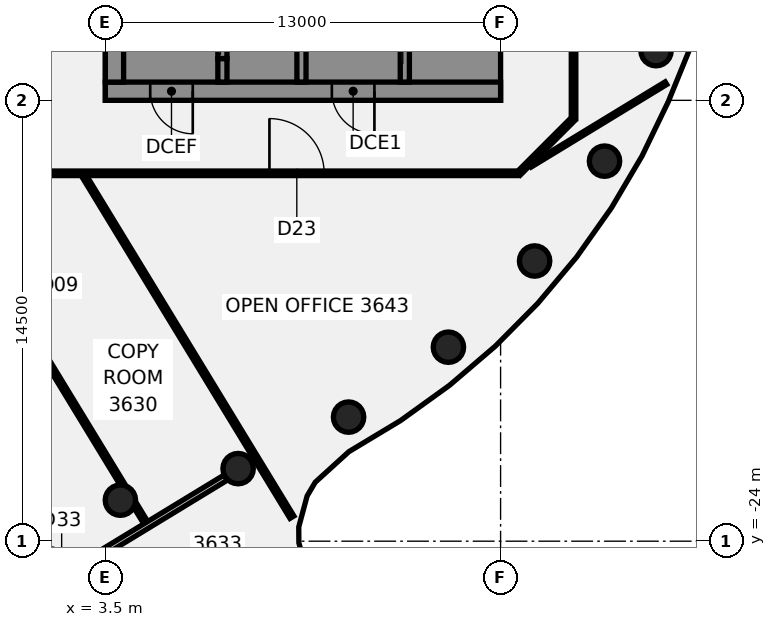
"""IFC4 building model, lengths in metres.
Left out: names, types, materials, properties, quantities, classifications, styles, units other than length and angle.
Written with IfcOpenShell. Run it as: python <this file> out.ifc"""

import sys

from ifc_helpers import new_model, si_unit, direction, frame, frame_2d, origin, origin_2d, place, context, subcontext, project, spatial, polyline, rectangle, circle, outline, extrude, element, fill, save


model = new_model("IFC4")
c1 = context("Model", 3, precision=1e-05, world=origin(), true_north=direction((0.0, 1.0)))
c2 = subcontext(c1, "Body", "Model", "MODEL_VIEW")
j1 = project(units=[si_unit("LENGTHUNIT", "METRE"), si_unit("PLANEANGLEUNIT", "RADIAN")], contexts=[c1])
p1 = place(None, origin())
s1 = spatial("IfcSite", under=j1, at=p1, CompositionType="ELEMENT")
p2 = place(p1, origin())
s2 = spatial("IfcBuilding", under=s1, at=p2, CompositionType="ELEMENT")
p3 = place(p2, frame((0.0, 0.0, 148.0)))
s3 = spatial("IfcBuildingStorey", under=s2, at=p3, CompositionType="ELEMENT", Elevation=148.0)
for number, where, z_axis, x_axis in (
    (1, (3.994, -22.651, -0.14), (0.0, 0.0, 1.0), (1.0, 0.0, 0.0)),
    (2, (7.866, -21.613, -0.14), (0.0, 0.0, 1.0), (1.0, 0.0, 0.0)),
    (3, (11.5, -19.919, -0.14), (0.0, 0.0, 1.0), (1.0, 0.0, 0.0)),
    (4, (14.784, -17.619, -0.14), (0.0, 0.0, 1.0), (1.0, 0.0, 0.0)),
    (5, (17.619, -14.784, -0.14), (0.0, 0.0, 1.0), (1.0, 0.0, 0.0)),
    (6, (19.919, -11.5, -0.14), (0.0, 0.0, 1.0), (1.0, 0.0, 0.0)),
    (7, (21.613, -7.866, -0.14), (0.0, 0.0, 1.0), (1.0, 0.0, 0.0)),
):
    element("IfcColumn", number, at=place(p3, frame(where, z_axis=z_axis, x_axis=x_axis)), inside=s3, PredefinedType="COLUMN", context=c2, shape_type="SweptSolid", body=[
        extrude(circle(Radius=0.5, at=origin_2d()), origin(), (0.0, 0.0, 1.0), 3.75),
    ])
p4 = place(p3, frame((-2.111, -11.998, 0.0), z_axis=(0.0, 0.0, 1.0), x_axis=(0.520158414561, -0.854069800287, 0.0)))
e8 = element("IfcWall", 8, at=p4, inside=s3, PredefinedType="PARTITIONING", context=c2, shape_type="SweptSolid", body=[
    extrude(rectangle(XDim=11.902, YDim=0.15, at=frame_2d((5.951, 0.0))), origin(), (0.0, 0.0, 1.0), 3.01),
])
p5 = place(p4, frame((3.785, 0.0, 0.0)))
e9 = element("IfcOpeningElement", 9, at=p5, cuts=e8, PredefinedType="OPENING", context=c2, shape_type="SweptSolid", body=[
    extrude(rectangle(XDim=0.9, YDim=2.1, at=frame_2d((0.45, 1.05))), frame((0.0, 0.085, 0.0), z_axis=(0.0, -1.0, 0.0), x_axis=(1.0, 0.0, 0.0)), (0.0, 0.0, 1.0), 0.17),
])
p6 = place(p3, frame((4.465, -22.796, 0.0), z_axis=(0.0, 0.0, 1.0), x_axis=(0.519991350708, -0.854171525625, 0.0)))
e10 = element("IfcWall", 10, at=p6, inside=s3, PredefinedType="PARTITIONING", context=c2, shape_type="SweptSolid", body=[
    extrude(rectangle(XDim=0.698, YDim=0.15, at=frame_2d((0.349, 0.0))), origin(), (0.0, 0.0, 1.0), 3.01),
])
p7 = place(p3, frame((2.807, -11.998, 0.0), z_axis=(0.0, 0.0, 1.0), x_axis=(0.520227143578, -0.854027938117, 0.0)))
e11 = element("IfcWall", 11, at=p7, inside=s3, PredefinedType="PARTITIONING", context=c2, shape_type="SweptSolid", body=[
    extrude(rectangle(XDim=13.129, YDim=0.15, at=frame_2d((6.564, 0.0))), origin(), (0.0, 0.0, 1.0), 3.01),
])
p8 = place(p3, frame((-17.1, -11.9, 0.0), z_axis=(0.0, 0.0, 1.0), x_axis=(1.0, 0.0, 0.0)))
e12 = element("IfcWall", 12, at=p8, inside=s3, PredefinedType="PARTITIONING", context=c2, shape_type="SweptSolid", body=[
    extrude(rectangle(XDim=34.165, YDim=0.15, at=frame_2d((17.083, 0.0))), origin(), (0.0, 0.0, 1.0), 3.01),
])
p9 = place(p8, frame((10.117, 0.0, 0.0)))
e13 = element("IfcOpeningElement", 13, at=p9, cuts=e12, PredefinedType="OPENING", context=c2, shape_type="SweptSolid", body=[
    extrude(rectangle(XDim=1.8, YDim=2.1, at=frame_2d((0.9, 1.05))), frame((0.0, 0.085, 0.0), z_axis=(0.0, -1.0, 0.0), x_axis=(1.0, 0.0, 0.0)), (0.0, 0.0, 1.0), 0.17),
])
p10 = place(p8, frame((1.8, 0.0, 0.0)))
e14 = element("IfcOpeningElement", 14, at=p10, cuts=e12, PredefinedType="OPENING", context=c2, shape_type="SweptSolid", body=[
    extrude(rectangle(XDim=1.8, YDim=2.1, at=frame_2d((0.9, 1.05))), frame((0.0, 0.085, 0.0), z_axis=(0.0, -1.0, 0.0), x_axis=(1.0, 0.0, 0.0)), (0.0, 0.0, 1.0), 0.17),
])
p11 = place(p8, frame((25.997, 0.0, 0.0)))
e15 = element("IfcOpeningElement", 15, at=p11, cuts=e12, PredefinedType="OPENING", context=c2, shape_type="SweptSolid", body=[
    extrude(rectangle(XDim=1.8, YDim=2.1, at=frame_2d((0.9, 1.05))), frame((0.0, 0.085, 0.0), z_axis=(0.0, -1.0, 0.0), x_axis=(1.0, 0.0, 0.0)), (0.0, 0.0, 1.0), 0.17),
])
p12 = place(p3, frame((-3.745, -28.73, 0.0), z_axis=(0.0, 0.0, 1.0), x_axis=(0.854090748312, 0.520124017565, 0.0)))
e16 = element("IfcWall", 16, at=p12, inside=s3, PredefinedType="PARTITIONING", context=c2, shape_type="SweptSolid", body=[
    extrude(rectangle(XDim=13.121, YDim=0.2, at=frame_2d((6.561, 0.0))), origin(), (0.0, 0.0, 1.0), 3.01),
])
p13 = place(p12, frame((6.099, 0.0, 0.0)))
e17 = element("IfcOpeningElement", 17, at=p13, cuts=e16, PredefinedType="OPENING", context=c2, shape_type="SweptSolid", body=[
    extrude(rectangle(XDim=1.4, YDim=2.1, at=frame_2d((0.7, 1.05))), frame((0.0, 0.11, 0.0), z_axis=(0.0, -1.0, 0.0), x_axis=(1.0, 0.0, 0.0)), (0.0, 0.0, 1.0), 0.22),
])
p14 = place(p3, frame((17.485, -11.649, 0.0), z_axis=(0.0, 0.0, 1.0), x_axis=(0.854029500241, 0.520224579118, 0.0)))
e18 = element("IfcWall", 18, at=p14, inside=s3, PredefinedType="PARTITIONING", context=c2, shape_type="SweptSolid", body=[
    extrude(rectangle(XDim=5.216, YDim=0.1, at=frame_2d((2.608, 0.0))), origin(), (0.0, 0.0, 1.0), 3.01),
])
p15 = place(p3, frame((17.1, -11.9, 0.0), z_axis=(0.0, 0.0, 1.0), x_axis=(0.707106781187, 0.707106781187, 0.0)))
e19 = element("IfcWall", 19, at=p15, inside=s3, PredefinedType="PARTITIONING", context=c2, shape_type="SweptSolid", body=[
    extrude(rectangle(XDim=2.505, YDim=0.15, at=frame_2d((1.253, 0.0))), origin(), (0.0, 0.0, 1.0), 3.01),
])
p16 = place(p3, frame((18.9, -10.1, 0.0), z_axis=(0.0, 0.0, 1.0), x_axis=(0.0, 1.0, 0.0)))
e20 = element("IfcWall", 20, at=p16, inside=s3, PredefinedType="PARTITIONING", context=c2, shape_type="SweptSolid", body=[
    extrude(rectangle(XDim=20.2, YDim=0.15, at=frame_2d((10.1, 0.0))), origin(), (0.0, 0.0, 1.0), 3.01),
])
p17 = place(p16, frame((8.281, 0.0, 0.0)))
e21 = element("IfcOpeningElement", 21, at=p17, cuts=e20, PredefinedType="OPENING", context=c2, shape_type="SweptSolid", body=[
    extrude(rectangle(XDim=1.8, YDim=2.1, at=frame_2d((0.9, 1.05))), frame((0.0, 0.085, 0.0), z_axis=(0.0, -1.0, 0.0), x_axis=(1.0, 0.0, 0.0)), (0.0, 0.0, 1.0), 0.17),
])
p18 = place(p16, frame((13.543, 0.0, 0.0)))
e22 = element("IfcOpeningElement", 22, at=p18, cuts=e20, PredefinedType="OPENING", context=c2, shape_type="SweptSolid", body=[
    extrude(rectangle(XDim=0.9, YDim=2.1, at=frame_2d((0.45, 1.05))), frame((0.0, 0.085, 0.0), z_axis=(0.0, -1.0, 0.0), x_axis=(1.0, 0.0, 0.0)), (0.0, 0.0, 1.0), 0.17),
])
p19 = place(p3, frame((16.5, -9.2, 0.0), z_axis=(0.0, 0.0, 1.0), x_axis=(-1.0, 0.0, 0.0)))
e23 = element("IfcWall", 23, at=p19, inside=s3, PredefinedType="SHEAR", context=c2, shape_type="SweptSolid", body=[
    extrude(rectangle(XDim=13.0, YDim=0.6, at=frame_2d((6.5, 0.0))), origin(), (0.0, 0.0, 1.0), 3.61),
])
p20 = place(p19, frame((4.15, 0.0, 0.0)))
e24 = element("IfcOpeningElement", 24, at=p20, cuts=e23, PredefinedType="OPENING", context=c2, shape_type="SweptSolid", body=[
    extrude(rectangle(XDim=1.4, YDim=2.1, at=frame_2d((0.7, 1.05))), frame((0.0, 0.31, 0.0), z_axis=(0.0, -1.0, 0.0), x_axis=(1.0, 0.0, 0.0)), (0.0, 0.0, 1.0), 0.62),
])
p21 = place(p19, frame((10.125, 0.0, 0.0)))
e25 = element("IfcOpeningElement", 25, at=p21, cuts=e23, PredefinedType="OPENING", context=c2, shape_type="SweptSolid", body=[
    extrude(rectangle(XDim=1.4, YDim=2.1, at=frame_2d((0.7, 1.05))), frame((0.0, 0.31, 0.0), z_axis=(0.0, -1.0, 0.0), x_axis=(1.0, 0.0, 0.0)), (0.0, 0.0, 1.0), 0.62),
])
p22 = place(p3, origin())
e26 = element("IfcWall", 26, at=p22, inside=s3, PredefinedType="SHEAR", context=c2, shape_type="SweptSolid", body=[
    extrude(outline(polyline([(13.5, -8.125), (13.5, -8.9), (15.9, -8.9), (16.5, -8.9), (16.5, 8.9), (15.9, 8.9), (13.5, 8.9), (13.5, 8.125), (15.9, 8.125), (15.9, 5.625), (13.5, 5.625), (13.5, 5.375), (15.9, 5.375), (15.9, -5.375), (13.5, -5.375), (13.5, -5.625), (15.9, -5.625), (15.9, -8.125), (13.5, -8.125)])), origin(), (0.0, 0.0, 1.0), 3.61),
])
p23 = place(p3, origin())
e27 = element("IfcWall", 27, at=p23, inside=s3, PredefinedType="SHEAR", context=c2, shape_type="SweptSolid", body=[
    extrude(outline(polyline([(7.5, -8.125), (7.5, -8.9), (9.8, -8.9), (9.8, -8.125), (9.8, -5.625), (9.55, -5.625), (9.55, -8.125), (7.5, -8.125)])), origin(), (0.0, 0.0, 1.0), 3.61),
])
p24 = place(p3, frame((7.35, -8.9, 0.0), z_axis=(0.0, 0.0, 1.0), x_axis=(0.0, 1.0, 0.0)))
e28 = element("IfcWall", 28, at=p24, inside=s3, PredefinedType="SHEAR", context=c2, shape_type="SweptSolid", body=[
    extrude(rectangle(XDim=0.775, YDim=0.3, at=frame_2d((0.387, 0.0))), origin(), (0.0, 0.0, 1.0), 3.61),
])
p25 = place(p3, frame((13.35, -8.9, 0.0), z_axis=(0.0, 0.0, 1.0), x_axis=(0.0, 1.0, 0.0)))
e29 = element("IfcWall", 29, at=p25, inside=s3, PredefinedType="SHEAR", context=c2, shape_type="SweptSolid", body=[
    extrude(rectangle(XDim=17.8, YDim=0.3, at=frame_2d((8.9, 0.0))), origin(), (0.0, 0.0, 1.0), 3.61),
])
p26 = place(p25, frame((1.325, 0.0, 0.0)))
e30 = element("IfcOpeningElement", 30, at=p26, cuts=e29, PredefinedType="OPENING", context=c2, shape_type="SweptSolid", body=[
    extrude(rectangle(XDim=1.4, YDim=2.1, at=frame_2d((0.7, 1.05))), frame((0.0, 0.16, 0.0), z_axis=(0.0, -1.0, 0.0), x_axis=(1.0, 0.0, 0.0)), (0.0, 0.0, 1.0), 0.32),
])
p27 = place(p25, frame((8.4, 0.0, 0.0)))
e31 = element("IfcOpeningElement", 31, at=p27, cuts=e29, PredefinedType="OPENING", context=c2, shape_type="SweptSolid", body=[
    extrude(rectangle(XDim=1.0, YDim=2.1, at=frame_2d((0.5, 1.05))), frame((0.0, 0.16, 0.0), z_axis=(0.0, -1.0, 0.0), x_axis=(1.0, 0.0, 0.0)), (0.0, 0.0, 1.0), 0.32),
])
p28 = place(p3, frame((9.95, -8.9, 0.0), z_axis=(0.0, 0.0, 1.0), x_axis=(0.0, 1.0, 0.0)))
e32 = element("IfcWall", 32, at=p28, inside=s3, PredefinedType="SHEAR", context=c2, shape_type="SweptSolid", body=[
    extrude(rectangle(XDim=17.8, YDim=0.3, at=frame_2d((8.9, 0.0))), origin(), (0.0, 0.0, 1.0), 3.61),
])
p29 = place(p28, frame((4.175, 0.0, 0.0)))
e33 = element("IfcOpeningElement", 33, at=p29, cuts=e32, PredefinedType="OPENING", context=c2, shape_type="SweptSolid", body=[
    extrude(rectangle(XDim=1.2, YDim=2.1, at=frame_2d((0.6, 1.05))), frame((0.0, 0.16, 0.0), z_axis=(0.0, -1.0, 0.0), x_axis=(1.0, 0.0, 0.0)), (0.0, 0.0, 1.0), 0.32),
])
p30 = place(p28, frame((6.925, 0.0, 0.0)))
e34 = element("IfcOpeningElement", 34, at=p30, cuts=e32, PredefinedType="OPENING", context=c2, shape_type="SweptSolid", body=[
    extrude(rectangle(XDim=1.2, YDim=2.1, at=frame_2d((0.6, 1.05))), frame((0.0, 0.16, 0.0), z_axis=(0.0, -1.0, 0.0), x_axis=(1.0, 0.0, 0.0)), (0.0, 0.0, 1.0), 0.32),
])
p31 = place(p3, frame((7.35, -8.125, 0.0), z_axis=(0.0, 0.0, 1.0), x_axis=(0.0, 1.0, 0.0)))
e35 = element("IfcWall", 35, at=p31, inside=s3, PredefinedType="SHEAR", context=c2, shape_type="SweptSolid", body=[
    extrude(rectangle(XDim=2.5, YDim=0.3, at=frame_2d((1.25, 0.0))), origin(), (0.0, 0.0, 1.0), 3.61),
])
p32 = place(p31, frame((0.7, 0.0, 0.0)))
e36 = element("IfcOpeningElement", 36, at=p32, cuts=e35, PredefinedType="OPENING", context=c2, shape_type="SweptSolid", body=[
    extrude(rectangle(XDim=1.1, YDim=2.1, at=frame_2d((0.55, 1.05))), frame((0.0, 0.16, 0.0), z_axis=(0.0, -1.0, 0.0), x_axis=(1.0, 0.0, 0.0)), (0.0, 0.0, 1.0), 0.32),
])
p33 = place(p3, frame((3.8, -8.9, 0.0), z_axis=(0.0, 0.0, 1.0), x_axis=(0.0, 1.0, 0.0)))
e37 = element("IfcWall", 37, at=p33, inside=s3, PredefinedType="SHEAR", context=c2, shape_type="SweptSolid", body=[
    extrude(rectangle(XDim=17.8, YDim=0.6, at=frame_2d((8.9, 0.0))), origin(), (0.0, 0.0, 1.0), 3.61),
])
p34 = place(p33, frame((1.25, 0.0, 0.0)))
e38 = element("IfcOpeningElement", 38, at=p34, cuts=e37, PredefinedType="OPENING", context=c2, shape_type="SweptSolid", body=[
    extrude(rectangle(XDim=1.8, YDim=2.1, at=frame_2d((0.9, 1.05))), frame((0.0, 0.31, 0.0), z_axis=(0.0, -1.0, 0.0), x_axis=(1.0, 0.0, 0.0)), (0.0, 0.0, 1.0), 0.62),
])
p35 = place(p33, frame((11.698, 0.0, 0.0)))
e39 = element("IfcOpeningElement", 39, at=p35, cuts=e37, PredefinedType="OPENING", context=c2, shape_type="SweptSolid", body=[
    extrude(rectangle(XDim=1.0, YDim=2.1, at=frame_2d((0.5, 1.05))), frame((0.0, 0.31, 0.0), z_axis=(0.0, -1.0, 0.0), x_axis=(1.0, 0.0, 0.0)), (0.0, 0.0, 1.0), 0.62),
])
p36 = place(p33, frame((15.222, 0.0, 0.0)))
e40 = element("IfcOpeningElement", 40, at=p36, cuts=e37, PredefinedType="OPENING", context=c2, shape_type="SweptSolid", body=[
    extrude(rectangle(XDim=1.0, YDim=2.1, at=frame_2d((0.5, 1.05))), frame((0.0, 0.31, 0.0), z_axis=(0.0, -1.0, 0.0), x_axis=(1.0, 0.0, 0.0)), (0.0, 0.0, 1.0), 0.62),
])
p37 = place(p11, frame((1.8, 0.0, 0.0), z_axis=(0.0, 0.0, 1.0), x_axis=(-1.0, 0.0, 0.0)))
e41 = element("IfcDoor", 41, at=p37, inside=s3, OperationType="DOUBLE_DOOR_SINGLE_SWING", PredefinedType="DOOR", context=c2, shape_type="SweptSolid", body=[
    extrude(rectangle(XDim=1.8, YDim=2.1, at=frame_2d((0.9, 1.05))), frame((0.0, 0.025, 0.0), z_axis=(0.0, -1.0, 0.0), x_axis=(1.0, 0.0, 0.0)), (0.0, 0.0, 1.0), 0.05),
])
fill(e15, e41)
p38 = place(p20, origin())
e42 = element("IfcDoor", 42, at=p38, inside=s3, OperationType="SINGLE_SWING_LEFT", PredefinedType="DOOR", context=c2, shape_type="SweptSolid", body=[
    extrude(rectangle(XDim=1.4, YDim=2.1, at=frame_2d((0.7, 1.05))), frame((0.0, 0.025, 0.0), z_axis=(0.0, -1.0, 0.0), x_axis=(1.0, 0.0, 0.0)), (0.0, 0.0, 1.0), 0.05),
])
fill(e24, e42)
p39 = place(p21, origin())
e43 = element("IfcDoor", 43, at=p39, inside=s3, OperationType="SINGLE_SWING_LEFT", PredefinedType="DOOR", context=c2, shape_type="SweptSolid", body=[
    extrude(rectangle(XDim=1.4, YDim=2.1, at=frame_2d((0.7, 1.05))), frame((0.0, 0.025, 0.0), z_axis=(0.0, -1.0, 0.0), x_axis=(1.0, 0.0, 0.0)), (0.0, 0.0, 1.0), 0.05),
])
fill(e25, e43)
save(model, sys.argv[1])
